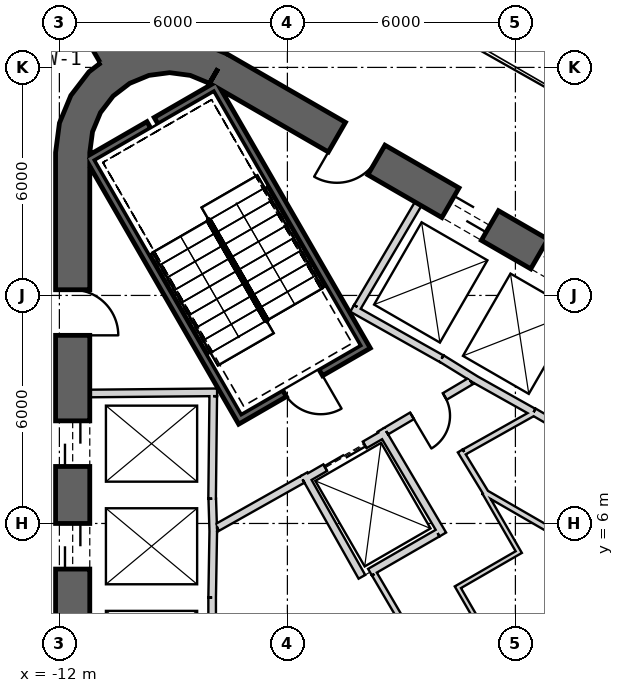
"""IFC4 building model, lengths in metres.
Left out: names, types, materials, properties, quantities, classifications, styles, units other than length and angle.
Written with IfcOpenShell. Run it as: python <this file> out.ifc"""

import sys

from ifc_helpers import new_model, si_unit, direction, frame, frame_2d, origin, place, context, subcontext, project, spatial, polyline, rectangle, outline, extrude, element, fill, save


model = new_model("IFC4")
c1 = context("Model", 3, precision=1e-05, world=origin(), true_north=direction((0.0, 1.0)))
c2 = subcontext(c1, "Body", "Model", "MODEL_VIEW")
j1 = project(units=[si_unit("LENGTHUNIT", "METRE"), si_unit("PLANEANGLEUNIT", "RADIAN")], contexts=[c1])
p1 = place(None, origin())
s1 = spatial("IfcSite", under=j1, at=p1, CompositionType="ELEMENT")
p2 = place(p1, origin())
s2 = spatial("IfcBuilding", under=s1, at=p2, CompositionType="ELEMENT")
p3 = place(p2, frame((0.0, 0.0, 9.0)))
s3 = spatial("IfcBuildingStorey", under=s2, at=p3, CompositionType="ELEMENT", Elevation=9.0)
p4 = place(p3, frame((19.475, 2.208, 0.0), z_axis=(0.0, 0.0, 1.0), x_axis=(-0.866028369851, 0.499994862586, 0.0)))
e1 = element("IfcWall", 1, at=p4, inside=s3, PredefinedType="SHEAR", context=c2, shape_type="SweptSolid", body=[
    extrude(rectangle(XDim=31.523, YDim=0.9, at=frame_2d((15.762, 0.0))), origin(), (0.0, 0.0, 1.0), 6.5),
])
p5 = place(p4, frame((7.062, 0.0, 0.0)))
e2 = element("IfcOpeningElement", 2, at=p5, cuts=e1, PredefinedType="OPENING", context=c2, shape_type="SweptSolid", body=[
    extrude(rectangle(XDim=1.2, YDim=2.4, at=frame_2d((0.6, 1.2))), frame((0.0, 0.46, 0.0), z_axis=(0.0, -1.0, 0.0), x_axis=(1.0, 0.0, 0.0)), (0.0, 0.0, 1.0), 0.92),
])
p6 = place(p4, frame((9.762, 0.0, 0.0)))
e3 = element("IfcOpeningElement", 3, at=p6, cuts=e1, PredefinedType="OPENING", context=c2, shape_type="SweptSolid", body=[
    extrude(rectangle(XDim=1.2, YDim=2.4, at=frame_2d((0.6, 1.2))), frame((0.0, 0.46, 0.0), z_axis=(0.0, -1.0, 0.0), x_axis=(1.0, 0.0, 0.0)), (0.0, 0.0, 1.0), 0.92),
])
p7 = place(p4, frame((12.462, 0.0, 0.0)))
e4 = element("IfcOpeningElement", 4, at=p7, cuts=e1, PredefinedType="OPENING", context=c2, shape_type="SweptSolid", body=[
    extrude(rectangle(XDim=1.2, YDim=2.4, at=frame_2d((0.6, 1.2))), frame((0.0, 0.46, 0.0), z_axis=(0.0, -1.0, 0.0), x_axis=(1.0, 0.0, 0.0)), (0.0, 0.0, 1.0), 0.92),
])
p8 = place(p4, frame((15.162, 0.0, 0.0)))
e5 = element("IfcOpeningElement", 5, at=p8, cuts=e1, PredefinedType="OPENING", context=c2, shape_type="SweptSolid", body=[
    extrude(rectangle(XDim=1.2, YDim=2.4, at=frame_2d((0.6, 1.2))), frame((0.0, 0.46, 0.0), z_axis=(0.0, -1.0, 0.0), x_axis=(1.0, 0.0, 0.0)), (0.0, 0.0, 1.0), 0.92),
])
p9 = place(p4, frame((17.862, 0.0, 0.0)))
e6 = element("IfcOpeningElement", 6, at=p9, cuts=e1, PredefinedType="OPENING", context=c2, shape_type="SweptSolid", body=[
    extrude(rectangle(XDim=1.2, YDim=2.4, at=frame_2d((0.6, 1.2))), frame((0.0, 0.46, 0.0), z_axis=(0.0, -1.0, 0.0), x_axis=(1.0, 0.0, 0.0)), (0.0, 0.0, 1.0), 0.92),
])
p10 = place(p4, frame((20.562, 0.0, 0.0)))
e7 = element("IfcOpeningElement", 7, at=p10, cuts=e1, PredefinedType="OPENING", context=c2, shape_type="SweptSolid", body=[
    extrude(rectangle(XDim=1.2, YDim=2.4, at=frame_2d((0.6, 1.2))), frame((0.0, 0.46, 0.0), z_axis=(0.0, -1.0, 0.0), x_axis=(1.0, 0.0, 0.0)), (0.0, 0.0, 1.0), 0.92),
])
p11 = place(p4, frame((23.262, 0.0, 0.0)))
e8 = element("IfcOpeningElement", 8, at=p11, cuts=e1, PredefinedType="OPENING", context=c2, shape_type="SweptSolid", body=[
    extrude(rectangle(XDim=1.2, YDim=2.4, at=frame_2d((0.6, 1.2))), frame((0.0, 0.46, 0.0), z_axis=(0.0, -1.0, 0.0), x_axis=(1.0, 0.0, 0.0)), (0.0, 0.0, 1.0), 0.92),
])
p12 = place(p4, frame((3.612, 0.0, 0.0)))
e9 = element("IfcOpeningElement", 9, at=p12, cuts=e1, PredefinedType="OPENING", context=c2, shape_type="SweptSolid", body=[
    extrude(rectangle(XDim=1.2, YDim=2.4, at=frame_2d((0.6, 1.2))), frame((0.0, 0.46, 0.0), z_axis=(0.0, -1.0, 0.0), x_axis=(1.0, 0.0, 0.0)), (0.0, 0.0, 1.0), 0.92),
])
p13 = place(p4, frame((26.712, 0.0, 0.0)))
e10 = element("IfcOpeningElement", 10, at=p13, cuts=e1, PredefinedType="OPENING", context=c2, shape_type="SweptSolid", body=[
    extrude(rectangle(XDim=1.2, YDim=2.4, at=frame_2d((0.6, 1.2))), frame((0.0, 0.46, 0.0), z_axis=(0.0, -1.0, 0.0), x_axis=(1.0, 0.0, 0.0)), (0.0, 0.0, 1.0), 0.92),
])
p14 = place(p3, frame((-11.65, 15.762, 0.0), z_axis=(0.0, 0.0, 1.0), x_axis=(0.0, -1.0, 0.0)))
e11 = element("IfcWall", 11, at=p14, inside=s3, PredefinedType="SHEAR", context=c2, shape_type="SweptSolid", body=[
    extrude(rectangle(XDim=31.523, YDim=0.9, at=frame_2d((15.762, 0.0))), origin(), (0.0, 0.0, 1.0), 6.5),
])
p15 = place(p14, frame((7.062, 0.0, 0.0)))
e12 = element("IfcOpeningElement", 12, at=p15, cuts=e11, PredefinedType="OPENING", context=c2, shape_type="SweptSolid", body=[
    extrude(rectangle(XDim=1.2, YDim=2.4, at=frame_2d((0.6, 1.2))), frame((0.0, 0.46, 0.0), z_axis=(0.0, -1.0, 0.0), x_axis=(1.0, 0.0, 0.0)), (0.0, 0.0, 1.0), 0.92),
])
p16 = place(p14, frame((9.762, 0.0, 0.0)))
e13 = element("IfcOpeningElement", 13, at=p16, cuts=e11, PredefinedType="OPENING", context=c2, shape_type="SweptSolid", body=[
    extrude(rectangle(XDim=1.2, YDim=2.4, at=frame_2d((0.6, 1.2))), frame((0.0, 0.46, 0.0), z_axis=(0.0, -1.0, 0.0), x_axis=(1.0, 0.0, 0.0)), (0.0, 0.0, 1.0), 0.92),
])
p17 = place(p14, frame((12.462, 0.0, 0.0)))
e14 = element("IfcOpeningElement", 14, at=p17, cuts=e11, PredefinedType="OPENING", context=c2, shape_type="SweptSolid", body=[
    extrude(rectangle(XDim=1.2, YDim=2.4, at=frame_2d((0.6, 1.2))), frame((0.0, 0.46, 0.0), z_axis=(0.0, -1.0, 0.0), x_axis=(1.0, 0.0, 0.0)), (0.0, 0.0, 1.0), 0.92),
])
p18 = place(p14, frame((15.162, 0.0, 0.0)))
e15 = element("IfcOpeningElement", 15, at=p18, cuts=e11, PredefinedType="OPENING", context=c2, shape_type="SweptSolid", body=[
    extrude(rectangle(XDim=1.2, YDim=2.4, at=frame_2d((0.6, 1.2))), frame((0.0, 0.46, 0.0), z_axis=(0.0, -1.0, 0.0), x_axis=(1.0, 0.0, 0.0)), (0.0, 0.0, 1.0), 0.92),
])
p19 = place(p14, frame((17.862, 0.0, 0.0)))
e16 = element("IfcOpeningElement", 16, at=p19, cuts=e11, PredefinedType="OPENING", context=c2, shape_type="SweptSolid", body=[
    extrude(rectangle(XDim=1.2, YDim=2.4, at=frame_2d((0.6, 1.2))), frame((0.0, 0.46, 0.0), z_axis=(0.0, -1.0, 0.0), x_axis=(1.0, 0.0, 0.0)), (0.0, 0.0, 1.0), 0.92),
])
p20 = place(p14, frame((20.562, 0.0, 0.0)))
e17 = element("IfcOpeningElement", 17, at=p20, cuts=e11, PredefinedType="OPENING", context=c2, shape_type="SweptSolid", body=[
    extrude(rectangle(XDim=1.2, YDim=2.4, at=frame_2d((0.6, 1.2))), frame((0.0, 0.46, 0.0), z_axis=(0.0, -1.0, 0.0), x_axis=(1.0, 0.0, 0.0)), (0.0, 0.0, 1.0), 0.92),
])
p21 = place(p14, frame((23.262, 0.0, 0.0)))
e18 = element("IfcOpeningElement", 18, at=p21, cuts=e11, PredefinedType="OPENING", context=c2, shape_type="SweptSolid", body=[
    extrude(rectangle(XDim=1.2, YDim=2.4, at=frame_2d((0.6, 1.2))), frame((0.0, 0.46, 0.0), z_axis=(0.0, -1.0, 0.0), x_axis=(1.0, 0.0, 0.0)), (0.0, 0.0, 1.0), 0.92),
])
p22 = place(p14, frame((3.612, 0.0, 0.0)))
e19 = element("IfcOpeningElement", 19, at=p22, cuts=e11, PredefinedType="OPENING", context=c2, shape_type="SweptSolid", body=[
    extrude(rectangle(XDim=1.2, YDim=2.4, at=frame_2d((0.6, 1.2))), frame((0.0, 0.46, 0.0), z_axis=(0.0, -1.0, 0.0), x_axis=(1.0, 0.0, 0.0)), (0.0, 0.0, 1.0), 0.92),
])
p23 = place(p14, frame((26.712, 0.0, 0.0)))
e20 = element("IfcOpeningElement", 20, at=p23, cuts=e11, PredefinedType="OPENING", context=c2, shape_type="SweptSolid", body=[
    extrude(rectangle(XDim=1.2, YDim=2.4, at=frame_2d((0.6, 1.2))), frame((0.0, 0.46, 0.0), z_axis=(0.0, -1.0, 0.0), x_axis=(1.0, 0.0, 0.0)), (0.0, 0.0, 1.0), 0.92),
])
p24 = place(p3, origin())
e21 = element("IfcWall", 21, at=p24, inside=s3, PredefinedType="SHEAR", context=c2, shape_type="SweptSolid", body=[
    extrude(outline(polyline([(-7.6, 18.36), (-8.323, 18.659), (-9.1, 18.762), (-9.876, 18.659), (-10.6, 18.36), (-11.221, 17.883), (-11.698, 17.262), (-11.998, 16.538), (-12.1, 15.762), (-11.2, 15.762), (-11.128, 16.305), (-10.919, 16.812), (-10.585, 17.247), (-10.15, 17.58), (-9.644, 17.79), (-9.1, 17.862), (-8.556, 17.79), (-8.05, 17.58), (-7.6, 18.36)])), origin(), (0.0, 0.0, 1.0), 6.5),
])
p25 = place(p3, frame((-10.575, 18.316, 0.0), z_axis=(0.0, 0.0, 1.0), x_axis=(-0.499996575515, 0.866027380903, 0.0)))
e22 = element("IfcWall", 22, at=p25, inside=s3, PredefinedType="SHEAR", context=c2, shape_type="SweptSolid", body=[
    extrude(rectangle(XDim=13.954, YDim=0.8, at=frame_2d((6.977, 0.0))), origin(), (0.0, 0.0, 1.0), 6.5),
])
p26 = place(p25, frame((2.05, 0.0, 0.0)))
e23 = element("IfcOpeningElement", 23, at=p26, cuts=e22, PredefinedType="OPENING", context=c2, shape_type="SweptSolid", body=[
    extrude(rectangle(XDim=1.4, YDim=2.4, at=frame_2d((0.7, 1.2))), frame((0.0, 0.41, 0.0), z_axis=(0.0, -1.0, 0.0), x_axis=(1.0, 0.0, 0.0)), (0.0, 0.0, 1.0), 0.82),
])
p27 = place(p3, frame((-11.2, 9.42, 0.0), z_axis=(0.0, 0.0, 1.0), x_axis=(0.999957167047, 0.009255488683, 0.0)))
e24 = element("IfcWall", 24, at=p27, inside=s3, PredefinedType="PLUMBINGWALL", context=c2, shape_type="SweptSolid", body=[
    extrude(rectangle(XDim=3.35, YDim=0.2, at=frame_2d((1.675, 0.0))), origin(), (0.0, 0.0, 1.0), 6.2),
])
p28 = place(p3, frame((-7.951, 9.35, 0.0), z_axis=(0.0, 0.0, 1.0), x_axis=(-0.011120469654, -0.999938165666, 0.0)))
e25 = element("IfcWall", 25, at=p28, inside=s3, PredefinedType="PLUMBINGWALL", context=c2, shape_type="SweptSolid", body=[
    extrude(rectangle(XDim=2.7, YDim=0.2, at=frame_2d((1.35, 0.0))), origin(), (0.0, 0.0, 1.0), 6.2),
])
p29 = place(p3, frame((7.497, 4.886, 0.0), z_axis=(0.0, 0.0, 1.0), x_axis=(-0.866030989016, 0.499990325971, 0.0)))
e26 = element("IfcWall", 26, at=p29, inside=s3, PredefinedType="PLUMBINGWALL", context=c2, shape_type="SweptSolid", body=[
    extrude(rectangle(XDim=8.1, YDim=0.2, at=frame_2d((4.05, 0.0))), origin(), (0.0, 0.0, 1.0), 6.2),
])
p30 = place(p3, frame((-7.977, 6.65, 0.0), z_axis=(0.0, 0.0, 1.0), x_axis=(0.030861509705, -0.999523670164, 0.0)))
e27 = element("IfcWall", 27, at=p30, inside=s3, PredefinedType="PLUMBINGWALL", context=c2, shape_type="SweptSolid", body=[
    extrude(rectangle(XDim=0.878, YDim=0.2, at=frame_2d((0.439, 0.0))), origin(), (0.0, 0.0, 1.0), 6.2),
])
p31 = place(p3, frame((-7.949, 5.894, 0.0), z_axis=(0.0, 0.0, 1.0), x_axis=(-0.016809909365, -0.999858703491, 0.0)))
e28 = element("IfcWall", 28, at=p31, inside=s3, PredefinedType="PLUMBINGWALL", context=c2, shape_type="SweptSolid", body=[
    extrude(rectangle(XDim=1.844, YDim=0.2, at=frame_2d((0.922, 0.0))), origin(), (0.0, 0.0, 1.0), 6.2),
])
p32 = place(p3, frame((-7.98, 4.05, 0.0), z_axis=(0.0, 0.0, 1.0), x_axis=(0.0, -1.0, 0.0)))
e29 = element("IfcWall", 29, at=p32, inside=s3, PredefinedType="PLUMBINGWALL", context=c2, shape_type="SweptSolid", body=[
    extrude(rectangle(XDim=8.1, YDim=0.2, at=frame_2d((4.05, 0.0))), origin(), (0.0, 0.0, 1.0), 6.2),
])
p33 = place(p3, frame((-1.941, 10.339, 0.0), z_axis=(0.0, 0.0, 1.0), x_axis=(0.850216889117, -0.526432561171, 0.0)))
e30 = element("IfcWall", 30, at=p33, inside=s3, PredefinedType="PLUMBINGWALL", context=c2, shape_type="SweptSolid", body=[
    extrude(rectangle(XDim=1.078, YDim=0.2, at=frame_2d((0.539, 0.0))), origin(), (0.0, 0.0, 1.0), 6.2),
])
p34 = place(p3, frame((0.478, 8.928, 0.0), z_axis=(0.0, 0.0, 1.0), x_axis=(-0.871988740738, 0.489525929882, 0.0)))
e31 = element("IfcWall", 31, at=p34, inside=s3, PredefinedType="PLUMBINGWALL", context=c2, shape_type="SweptSolid", body=[
    extrude(rectangle(XDim=1.845, YDim=0.2, at=frame_2d((0.922, 0.0))), origin(), (0.0, 0.0, 1.0), 6.2),
])
p35 = place(p3, frame((-4.296, 11.659, 0.0), z_axis=(0.0, 0.0, 1.0), x_axis=(0.871534483978, -0.490334215854, 0.0)))
e32 = element("IfcWall", 32, at=p35, inside=s3, PredefinedType="PLUMBINGWALL", context=c2, shape_type="SweptSolid", body=[
    extrude(rectangle(XDim=2.7, YDim=0.2, at=frame_2d((1.35, 0.0))), origin(), (0.0, 0.0, 1.0), 6.2),
])
p36 = place(p3, frame((-4.158, 11.696, 0.0), z_axis=(0.0, 0.0, 1.0), x_axis=(0.508018930956, 0.861345903683, 0.0)))
e33 = element("IfcWall", 33, at=p36, inside=s3, PredefinedType="PLUMBINGWALL", context=c2, shape_type="SweptSolid", body=[
    extrude(rectangle(XDim=3.15, YDim=0.2, at=frame_2d((1.575, 0.0))), origin(), (0.0, 0.0, 1.0), 6.2),
])
p37 = place(p3, frame((-11.245, 15.678, -0.3), z_axis=(0.0, 0.0, 1.0), x_axis=(0.499977274689, -0.866038523851, 0.0)))
e34 = element("IfcWall", 34, at=p37, inside=s3, PredefinedType="SHEAR", context=c2, shape_type="SweptSolid", body=[
    extrude(rectangle(XDim=8.1, YDim=0.2, at=frame_2d((4.05, 0.0))), origin(), (0.0, 0.0, 1.0), 6.5),
])
p38 = place(p3, frame((-7.818, 17.541, -0.3), z_axis=(0.0, 0.0, 1.0), x_axis=(-0.866088799389, -0.499890179513, 0.0)))
e35 = element("IfcWall", 35, at=p38, inside=s3, PredefinedType="SHEAR", context=c2, shape_type="SweptSolid", body=[
    extrude(rectangle(XDim=1.89, YDim=0.2, at=frame_2d((0.945, 0.0))), origin(), (0.0, 0.0, 1.0), 6.5),
])
p39 = place(p3, frame((-9.645, 16.486, -0.3), z_axis=(0.0, 0.0, 1.0), x_axis=(-0.866038843867, -0.499976720371, 0.0)))
e36 = element("IfcWall", 36, at=p39, inside=s3, PredefinedType="SHEAR", context=c2, shape_type="SweptSolid", body=[
    extrude(rectangle(XDim=1.69, YDim=0.2, at=frame_2d((0.845, 0.0))), origin(), (0.0, 0.0, 1.0), 6.5),
])
p40 = place(p3, frame((-7.854, 17.405, -0.3), z_axis=(0.0, 0.0, 1.0), x_axis=(0.499997992926, -0.866026562566, 0.0)))
e37 = element("IfcWall", 37, at=p40, inside=s3, PredefinedType="SHEAR", context=c2, shape_type="SweptSolid", body=[
    extrude(rectangle(XDim=7.9, YDim=0.2, at=frame_2d((3.95, 0.0))), origin(), (0.0, 0.0, 1.0), 6.5),
])
p41 = place(p3, frame((-7.159, 8.8, -0.3), z_axis=(0.0, 0.0, 1.0), x_axis=(0.866047807691, 0.499961193289, 0.0)))
e38 = element("IfcWall", 38, at=p41, inside=s3, PredefinedType="SHEAR", context=c2, shape_type="SweptSolid", body=[
    extrude(rectangle(XDim=3.6, YDim=0.2, at=frame_2d((1.8, 0.0))), origin(), (0.0, 0.0, 1.0), 6.5),
])
p42 = place(p41, frame((1.25, 0.0, 0.3)))
e39 = element("IfcOpeningElement", 39, at=p42, cuts=e38, PredefinedType="OPENING", context=c2, shape_type="SweptSolid", body=[
    extrude(rectangle(XDim=1.1, YDim=2.1, at=frame_2d((0.55, 1.05))), frame((0.0, 0.11, 0.0), z_axis=(0.0, -1.0, 0.0), x_axis=(1.0, 0.0, 0.0)), (0.0, 0.0, 1.0), 0.22),
])
p43 = place(p3, frame((-5.524, 7.168, 0.0), z_axis=(0.0, 0.0, 1.0), x_axis=(0.866024647952, 0.500001309137, 0.0)))
e40 = element("IfcWall", 40, at=p43, inside=s3, PredefinedType="PLUMBINGWALL", context=c2, shape_type="SweptSolid", body=[
    extrude(rectangle(XDim=2.4, YDim=0.2, at=frame_2d((1.2, 0.0))), origin(), (0.0, 0.0, 1.0), 6.2),
])
p44 = place(p43, frame((0.6, 0.0, 0.0)))
e41 = element("IfcOpeningElement", 41, at=p44, cuts=e40, PredefinedType="OPENING", context=c2, shape_type="SweptSolid", body=[
    extrude(rectangle(XDim=1.2, YDim=2.4, at=frame_2d((0.6, 1.2))), frame((0.0, 0.11, 0.0), z_axis=(0.0, -1.0, 0.0), x_axis=(1.0, 0.0, 0.0)), (0.0, 0.0, 1.0), 0.22),
])
p45 = place(p3, frame((-4.039, 4.596, 0.0), z_axis=(0.0, 0.0, 1.0), x_axis=(-0.491322718731, 0.870977603649, 0.0)))
e42 = element("IfcWall", 42, at=p45, inside=s3, PredefinedType="PLUMBINGWALL", context=c2, shape_type="SweptSolid", body=[
    extrude(rectangle(XDim=3.1, YDim=0.2, at=frame_2d((1.55, 0.0))), origin(), (0.0, 0.0, 1.0), 6.2),
])
p46 = place(p3, frame((-3.538, 8.465, 0.0), z_axis=(0.0, 0.0, 1.0), x_axis=(0.508616218331, -0.860993346345, 0.0)))
e43 = element("IfcWall", 43, at=p46, inside=s3, PredefinedType="PLUMBINGWALL", context=c2, shape_type="SweptSolid", body=[
    extrude(rectangle(XDim=3.2, YDim=0.2, at=frame_2d((1.6, 0.0))), origin(), (0.0, 0.0, 1.0), 6.2),
])
p47 = place(p3, frame((-2.047, 5.746, 0.0), z_axis=(0.0, 0.0, 1.0), x_axis=(-0.86606290101, -0.499935047276, 0.0)))
e44 = element("IfcWall", 44, at=p47, inside=s3, PredefinedType="PLUMBINGWALL", context=c2, shape_type="SweptSolid", body=[
    extrude(rectangle(XDim=2.054, YDim=0.2, at=frame_2d((1.027, 0.0))), origin(), (0.0, 0.0, 1.0), 6.2),
])
p48 = place(p3, frame((-5.6, 7.16, 0.0), z_axis=(0.0, 0.0, 1.0), x_axis=(-0.871340486379, -0.490678873396, 0.0)))
e45 = element("IfcWall", 45, at=p48, inside=s3, PredefinedType="PARTITIONING", context=c2, shape_type="SweptSolid", body=[
    extrude(rectangle(XDim=2.581, YDim=0.2, at=frame_2d((1.291, 0.0))), origin(), (0.0, 0.0, 1.0), 6.2),
])
p49 = place(p3, frame((-1.179, 9.745, 0.0), z_axis=(0.0, 0.0, 1.0), x_axis=(-0.860598681535, -0.509283721849, 0.0)))
e46 = element("IfcWall", 46, at=p49, inside=s3, PredefinedType="PARTITIONING", context=c2, shape_type="SweptSolid", body=[
    extrude(rectangle(XDim=2.581, YDim=0.2, at=frame_2d((1.291, 0.0))), origin(), (0.0, 0.0, 1.0), 6.2),
])
p50 = place(p49, frame((0.791, 0.0, 0.0)))
e47 = element("IfcOpeningElement", 47, at=p50, cuts=e46, PredefinedType="OPENING", context=c2, shape_type="SweptSolid", body=[
    extrude(rectangle(XDim=1.0, YDim=2.1, at=frame_2d((0.5, 1.05))), frame((0.0, 0.11, 0.0), z_axis=(0.0, -1.0, 0.0), x_axis=(1.0, 0.0, 0.0)), (0.0, 0.0, 1.0), 0.22),
])
p51 = place(p3, frame((-1.407, 0.74, 0.0), z_axis=(0.0, 0.0, 1.0), x_axis=(-0.505642484845, 0.862743112125, 0.0)))
e48 = element("IfcWall", 48, at=p51, inside=s3, PredefinedType="PLUMBINGWALL", context=c2, shape_type="SweptSolid", body=[
    extrude(rectangle(XDim=4.556, YDim=0.15, at=frame_2d((2.278, 0.0))), origin(), (0.0, 0.0, 1.0), 6.2),
])
p52 = place(p51, frame((1.942, 0.0, 0.0)))
e49 = element("IfcOpeningElement", 49, at=p52, cuts=e48, PredefinedType="OPENING", context=c2, shape_type="SweptSolid", body=[
    extrude(rectangle(XDim=0.8, YDim=2.1, at=frame_2d((0.4, 1.05))), frame((0.0, 0.085, 0.0), z_axis=(0.0, -1.0, 0.0), x_axis=(1.0, 0.0, 0.0)), (0.0, 0.0, 1.0), 0.17),
])
p53 = place(p3, frame((-0.827, 6.832, 0.0), z_axis=(0.0, 0.0, 1.0), x_axis=(0.866020293397, -0.500008851346, 0.0)))
e50 = element("IfcWall", 50, at=p53, inside=s3, PredefinedType="PLUMBINGWALL", context=c2, shape_type="SweptSolid", body=[
    extrude(rectangle(XDim=8.264, YDim=0.15, at=frame_2d((4.132, 0.0))), origin(), (0.0, 0.0, 1.0), 6.2),
])
p54 = place(p3, frame((-1.451, 7.909, 0.0), z_axis=(0.0, 0.0, 1.0), x_axis=(0.520332410011, -0.853963806664, 0.0)))
e51 = element("IfcWall", 51, at=p54, inside=s3, PredefinedType="PLUMBINGWALL", context=c2, shape_type="SweptSolid", body=[
    extrude(rectangle(XDim=1.326, YDim=0.15, at=frame_2d((0.663, 0.0))), origin(), (0.0, 0.0, 1.0), 6.2),
])
p55 = place(p3, frame((0.475, 8.905, 0.0), z_axis=(0.0, 0.0, 1.0), x_axis=(-0.871843752163, -0.489784107353, 0.0)))
e52 = element("IfcWall", 52, at=p55, inside=s3, PredefinedType="PLUMBINGWALL", context=c2, shape_type="SweptSolid", body=[
    extrude(rectangle(XDim=2.09, YDim=0.15, at=frame_2d((1.045, 0.0))), origin(), (0.0, 0.0, 1.0), 6.2),
])
p56 = place(p3, frame((-1.544, 4.374, 0.0), z_axis=(0.0, 0.0, 1.0), x_axis=(0.500023124857, -0.86601205223, 0.0)))
e53 = element("IfcWall", 53, at=p56, inside=s3, PredefinedType="PARTITIONING", context=c2, shape_type="SweptSolid", body=[
    extrude(rectangle(XDim=3.069, YDim=0.12, at=frame_2d((1.535, 0.0))), origin(), (0.0, 0.0, 1.0), 6.2),
])
p57 = place(p56, frame((1.165, 0.0, 0.0)))
e54 = element("IfcOpeningElement", 54, at=p57, cuts=e53, PredefinedType="OPENING", context=c2, shape_type="SweptSolid", body=[
    extrude(rectangle(XDim=0.8, YDim=2.1, at=frame_2d((0.4, 1.05))), frame((0.0, 0.07, 0.0), z_axis=(0.0, -1.0, 0.0), x_axis=(1.0, 0.0, 0.0)), (0.0, 0.0, 1.0), 0.14),
])
p58 = place(p3, frame((0.14, 5.277, 0.0), z_axis=(0.0, 0.0, 1.0), x_axis=(-0.866000971088, -0.500042316284, 0.0)))
e55 = element("IfcWall", 55, at=p58, inside=s3, PredefinedType="PARTITIONING", context=c2, shape_type="SweptSolid", body=[
    extrude(rectangle(XDim=1.85, YDim=0.12, at=frame_2d((0.925, 0.0))), origin(), (0.0, 0.0, 1.0), 6.2),
])
p59 = place(p3, frame((-0.812, 6.806, 0.0), z_axis=(0.0, 0.0, 1.0), x_axis=(0.500046227757, -0.865998712531, 0.0)))
e56 = element("IfcWall", 56, at=p59, inside=s3, PredefinedType="PARTITIONING", context=c2, shape_type="SweptSolid", body=[
    extrude(rectangle(XDim=1.74, YDim=0.12, at=frame_2d((0.87, 0.0))), origin(), (0.0, 0.0, 1.0), 6.2),
])
p60 = place(p42, origin())
e57 = element("IfcDoor", 57, at=p60, inside=s3, OperationType="SINGLE_SWING_RIGHT", PredefinedType="USERDEFINED", context=c2, shape_type="SweptSolid", body=[
    extrude(rectangle(XDim=1.1, YDim=2.1, at=frame_2d((0.55, 1.05))), frame((0.0, 0.025, 0.0), z_axis=(0.0, -1.0, 0.0), x_axis=(1.0, 0.0, 0.0)), (0.0, 0.0, 1.0), 0.05),
])
fill(e39, e57)
p61 = place(p50, origin())
e58 = element("IfcDoor", 58, at=p61, inside=s3, OperationType="SINGLE_SWING_RIGHT", PredefinedType="USERDEFINED", context=c2, shape_type="SweptSolid", body=[
    extrude(rectangle(XDim=1.0, YDim=2.1, at=frame_2d((0.5, 1.05))), frame((0.0, 0.025, 0.0), z_axis=(0.0, -1.0, 0.0), x_axis=(1.0, 0.0, 0.0)), (0.0, 0.0, 1.0), 0.05),
])
fill(e47, e58)
p62 = place(p44, origin())
e59 = element("IfcDoor", 59, at=p62, inside=s3, OperationType="SLIDING_TO_LEFT", PredefinedType="USERDEFINED", context=c2, shape_type="SweptSolid", body=[
    extrude(rectangle(XDim=1.2, YDim=2.4, at=frame_2d((0.6, 1.2))), frame((0.0, 0.025, 0.0), z_axis=(0.0, -1.0, 0.0), x_axis=(1.0, 0.0, 0.0)), (0.0, 0.0, 1.0), 0.05),
])
fill(e41, e59)
p63 = place(p15, origin())
e60 = element("IfcDoor", 60, at=p63, inside=s3, OperationType="SLIDING_TO_LEFT", PredefinedType="USERDEFINED", context=c2, shape_type="SweptSolid", body=[
    extrude(rectangle(XDim=1.2, YDim=2.4, at=frame_2d((0.6, 1.2))), frame((0.0, 0.025, 0.0), z_axis=(0.0, -1.0, 0.0), x_axis=(1.0, 0.0, 0.0)), (0.0, 0.0, 1.0), 0.05),
])
fill(e12, e60)
p64 = place(p16, origin())
e61 = element("IfcDoor", 61, at=p64, inside=s3, OperationType="SLIDING_TO_LEFT", PredefinedType="USERDEFINED", context=c2, shape_type="SweptSolid", body=[
    extrude(rectangle(XDim=1.2, YDim=2.4, at=frame_2d((0.6, 1.2))), frame((0.0, 0.025, 0.0), z_axis=(0.0, -1.0, 0.0), x_axis=(1.0, 0.0, 0.0)), (0.0, 0.0, 1.0), 0.05),
])
fill(e13, e61)
p65 = place(p10, origin())
e62 = element("IfcDoor", 62, at=p65, inside=s3, OperationType="SLIDING_TO_LEFT", PredefinedType="USERDEFINED", context=c2, shape_type="SweptSolid", body=[
    extrude(rectangle(XDim=1.2, YDim=2.4, at=frame_2d((0.6, 1.2))), frame((0.0, 0.025, 0.0), z_axis=(0.0, -1.0, 0.0), x_axis=(1.0, 0.0, 0.0)), (0.0, 0.0, 1.0), 0.05),
])
fill(e7, e62)
p66 = place(p11, origin())
e63 = element("IfcDoor", 63, at=p66, inside=s3, OperationType="SLIDING_TO_LEFT", PredefinedType="USERDEFINED", context=c2, shape_type="SweptSolid", body=[
    extrude(rectangle(XDim=1.2, YDim=2.4, at=frame_2d((0.6, 1.2))), frame((0.0, 0.025, 0.0), z_axis=(0.0, -1.0, 0.0), x_axis=(1.0, 0.0, 0.0)), (0.0, 0.0, 1.0), 0.05),
])
fill(e8, e63)
p67 = place(p13, origin())
e64 = element("IfcDoor", 64, at=p67, inside=s3, OperationType="SINGLE_SWING_RIGHT", PredefinedType="USERDEFINED", context=c2, shape_type="SweptSolid", body=[
    extrude(rectangle(XDim=1.2, YDim=2.4, at=frame_2d((0.6, 1.2))), frame((0.0, 0.025, 0.0), z_axis=(0.0, -1.0, 0.0), x_axis=(1.0, 0.0, 0.0)), (0.0, 0.0, 1.0), 0.05),
])
fill(e10, e64)
p68 = place(p22, origin())
e65 = element("IfcDoor", 65, at=p68, inside=s3, OperationType="SINGLE_SWING_RIGHT", PredefinedType="USERDEFINED", context=c2, shape_type="SweptSolid", body=[
    extrude(rectangle(XDim=1.2, YDim=2.4, at=frame_2d((0.6, 1.2))), frame((0.0, 0.025, 0.0), z_axis=(0.0, -1.0, 0.0), x_axis=(1.0, 0.0, 0.0)), (0.0, 0.0, 1.0), 0.05),
])
fill(e19, e65)
save(model, sys.argv[1])
